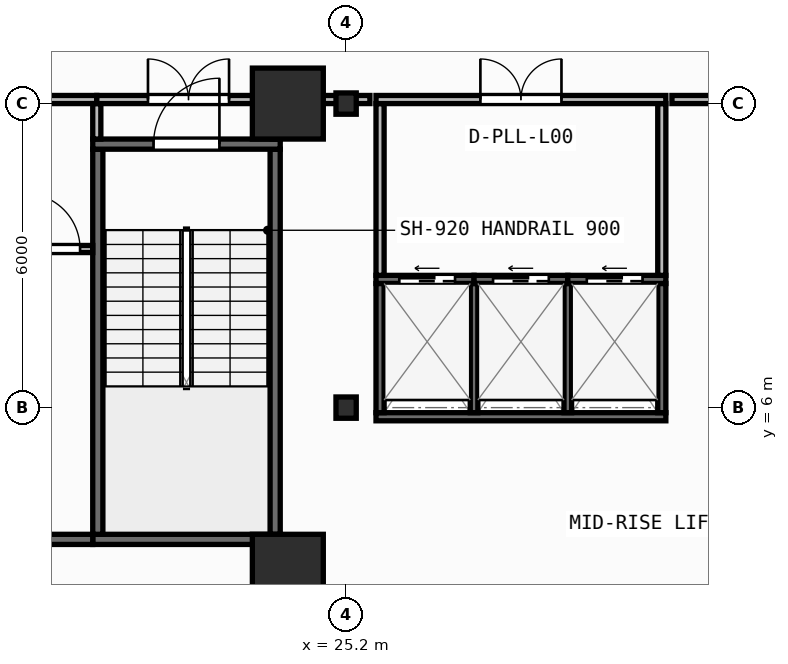
"""IFC4 building model, lengths in metres.
Left out: names, types, materials, properties, quantities, classifications, styles, units other than length and angle.
Written with IfcOpenShell. Run it as: python <this file> out.ifc"""

import sys

from ifc_helpers import new_model, si_unit, direction, frame, frame_2d, origin, origin_2d, place, context, subcontext, project, spatial, rectangle, i_section, extrude, element, fill, save


model = new_model("IFC4")
c1 = context("Model", 3, precision=1e-05, world=origin(), true_north=direction((0.0, 1.0)))
c2 = subcontext(c1, "Body", "Model", "MODEL_VIEW")
j1 = project(units=[si_unit("LENGTHUNIT", "METRE"), si_unit("PLANEANGLEUNIT", "RADIAN")], contexts=[c1])
p1 = place(None, origin())
s1 = spatial("IfcSite", under=j1, at=p1, CompositionType="ELEMENT")
p2 = place(p1, origin())
s2 = spatial("IfcBuilding", under=s1, at=p2, CompositionType="ELEMENT")
p3 = place(p2, origin())
s3 = spatial("IfcBuildingStorey", under=s2, at=p3, CompositionType="ELEMENT", Elevation=0.0)
p4 = place(p3, frame((24.05, 2.8, 0.0), z_axis=(0.0, 0.0, 1.0), x_axis=(1.0, 0.0, 0.0)))
e1 = element("IfcColumn", 1, at=p4, inside=s3, PredefinedType="COLUMN", context=c2, shape_type="SweptSolid", body=[
    extrude(rectangle(XDim=1.4, YDim=1.4, at=origin_2d()), origin(), (0.0, 0.0, 1.0), 4.5),
])
p5 = place(p3, frame((25.2, 6.0, 0.0), z_axis=(0.0, 0.0, 1.0), x_axis=(1.0, 0.0, 0.0)))
e2 = element("IfcColumn", 2, at=p5, inside=s3, PredefinedType="COLUMN", context=c2, shape_type="SweptSolid", body=[
    extrude(i_section(OverallWidth=0.4, OverallDepth=0.42, WebThickness=0.025, FlangeThickness=0.04, at=origin_2d()), origin(), (0.0, 0.0, 1.0), 4.5),
])
p6 = place(p3, frame((24.05, 12.0, 0.0), z_axis=(0.0, 0.0, 1.0), x_axis=(1.0, 0.0, 0.0)))
e3 = element("IfcColumn", 3, at=p6, inside=s3, PredefinedType="COLUMN", context=c2, shape_type="SweptSolid", body=[
    extrude(rectangle(XDim=1.4, YDim=1.4, at=origin_2d()), origin(), (0.0, 0.0, 1.0), 4.5),
])
p7 = place(p3, frame((25.2, 12.0, 0.0), z_axis=(0.0, 0.0, 1.0), x_axis=(1.0, 0.0, 0.0)))
e4 = element("IfcColumn", 4, at=p7, inside=s3, PredefinedType="COLUMN", context=c2, shape_type="SweptSolid", body=[
    extrude(i_section(OverallWidth=0.4, OverallDepth=0.42, WebThickness=0.025, FlangeThickness=0.04, at=origin_2d()), origin(), (0.0, 0.0, 1.0), 4.5),
])
p8 = place(p3, frame((20.2, 3.4, 0.0), z_axis=(0.0, 0.0, 1.0), x_axis=(1.0, 0.0, 0.0)))
e5 = element("IfcWall", 5, at=p8, inside=s3, PredefinedType="SHEAR", context=c2, shape_type="SweptSolid", body=[
    extrude(rectangle(XDim=3.7, YDim=0.2, at=frame_2d((1.85, 0.0))), origin(), (0.0, 0.0, 1.0), 4.25),
])
for number, where, z_axis, x_axis in (
    (6, (20.3, 3.5, 0.0), (0.0, 0.0, 1.0), (0.0, 1.0, 0.0)),
    (7, (23.8, 3.5, 0.0), (0.0, 0.0, 1.0), (0.0, 1.0, 0.0)),
):
    element("IfcWall", number, at=place(p3, frame(where, z_axis=z_axis, x_axis=x_axis)), inside=s3, PredefinedType="SHEAR", context=c2, shape_type="SweptSolid", body=[
        extrude(rectangle(XDim=7.6, YDim=0.2, at=frame_2d((3.8, 0.0))), origin(), (0.0, 0.0, 1.0), 4.25),
    ])
p9 = place(p3, frame((20.2, 11.2, 0.0), z_axis=(0.0, 0.0, 1.0), x_axis=(1.0, 0.0, 0.0)))
e8 = element("IfcWall", 8, at=p9, inside=s3, PredefinedType="SHEAR", context=c2, shape_type="SweptSolid", body=[
    extrude(rectangle(XDim=3.7, YDim=0.2, at=frame_2d((1.85, 0.0))), origin(), (0.0, 0.0, 1.0), 4.25),
])
p10 = place(p9, frame((1.2, 0.0, 0.0)))
e9 = element("IfcOpeningElement", 9, at=p10, cuts=e8, PredefinedType="OPENING", context=c2, shape_type="SweptSolid", body=[
    extrude(rectangle(XDim=1.3, YDim=2.15, at=frame_2d((0.65, 1.075))), frame((0.0, 0.11, 0.0), z_axis=(0.0, -1.0, 0.0), x_axis=(1.0, 0.0, 0.0)), (0.0, 0.0, 1.0), 0.22),
])
p11 = place(p3, frame((6.5, 3.4, 0.0), z_axis=(0.0, 0.0, 1.0), x_axis=(1.0, 0.0, 0.0)))
e10 = element("IfcWall", 10, at=p11, inside=s3, PredefinedType="SHEAR", context=c2, shape_type="SweptSolid", body=[
    extrude(rectangle(XDim=13.7, YDim=0.2, at=frame_2d((6.85, 0.0))), origin(), (0.0, 0.0, 1.0), 4.25),
])
p12 = place(p3, frame((25.79, 5.82, 0.0), z_axis=(0.0, 0.0, 1.0), x_axis=(1.0, 0.0, 0.0)))
e11 = element("IfcWall", 11, at=p12, inside=s3, PredefinedType="SHEAR", context=c2, shape_type="SweptSolid", body=[
    extrude(rectangle(XDim=5.72, YDim=0.16, at=frame_2d((2.86, 0.0))), origin(), (0.0, 0.0, 1.0), 4.25),
])
for number, where, z_axis, x_axis in (
    (12, (25.87, 5.9, 0.0), (0.0, 0.0, 1.0), (0.0, 1.0, 0.0)),
    (13, (31.43, 5.9, 0.0), (0.0, 0.0, 1.0), (0.0, 1.0, 0.0)),
):
    element("IfcWall", number, at=place(p3, frame(where, z_axis=z_axis, x_axis=x_axis)), inside=s3, PredefinedType="SHEAR", context=c2, shape_type="SweptSolid", body=[
        extrude(rectangle(XDim=2.55, YDim=0.16, at=frame_2d((1.275, 0.0))), origin(), (0.0, 0.0, 1.0), 4.25),
    ])
for number, where, z_axis, x_axis in (
    (14, (27.725, 5.9, 0.0), (0.0, 0.0, 1.0), (0.0, 1.0, 0.0)),
    (15, (29.575, 5.9, 0.0), (0.0, 0.0, 1.0), (0.0, 1.0, 0.0)),
):
    element("IfcWall", number, at=place(p3, frame(where, z_axis=z_axis, x_axis=x_axis)), inside=s3, PredefinedType="SHEAR", context=c2, shape_type="SweptSolid", body=[
        extrude(rectangle(XDim=2.55, YDim=0.15, at=frame_2d((1.275, 0.0))), origin(), (0.0, 0.0, 1.0), 4.25),
    ])
p13 = place(p3, frame((25.79, 8.53, 0.0), z_axis=(0.0, 0.0, 1.0), x_axis=(1.0, 0.0, 0.0)))
e16 = element("IfcWall", 16, at=p13, inside=s3, PredefinedType="SHEAR", context=c2, shape_type="SweptSolid", body=[
    extrude(rectangle(XDim=1.935, YDim=0.16, at=frame_2d((0.968, 0.0))), origin(), (0.0, 0.0, 1.0), 4.25),
])
p14 = place(p13, frame((0.46, 0.0, 0.0)))
e17 = element("IfcOpeningElement", 17, at=p14, cuts=e16, PredefinedType="OPENING", context=c2, shape_type="SweptSolid", body=[
    extrude(rectangle(XDim=1.1, YDim=2.15, at=frame_2d((0.55, 1.075))), frame((0.0, 0.09, 0.0), z_axis=(0.0, -1.0, 0.0), x_axis=(1.0, 0.0, 0.0)), (0.0, 0.0, 1.0), 0.18),
])
p15 = place(p3, frame((27.725, 8.53, 0.0), z_axis=(0.0, 0.0, 1.0), x_axis=(1.0, 0.0, 0.0)))
e18 = element("IfcWall", 18, at=p15, inside=s3, PredefinedType="SHEAR", context=c2, shape_type="SweptSolid", body=[
    extrude(rectangle(XDim=1.85, YDim=0.16, at=frame_2d((0.925, 0.0))), origin(), (0.0, 0.0, 1.0), 4.25),
])
p16 = place(p15, frame((0.375, 0.0, 0.0)))
e19 = element("IfcOpeningElement", 19, at=p16, cuts=e18, PredefinedType="OPENING", context=c2, shape_type="SweptSolid", body=[
    extrude(rectangle(XDim=1.1, YDim=2.15, at=frame_2d((0.55, 1.075))), frame((0.0, 0.09, 0.0), z_axis=(0.0, -1.0, 0.0), x_axis=(1.0, 0.0, 0.0)), (0.0, 0.0, 1.0), 0.18),
])
p17 = place(p3, frame((29.575, 8.53, 0.0), z_axis=(0.0, 0.0, 1.0), x_axis=(1.0, 0.0, 0.0)))
e20 = element("IfcWall", 20, at=p17, inside=s3, PredefinedType="SHEAR", context=c2, shape_type="SweptSolid", body=[
    extrude(rectangle(XDim=1.935, YDim=0.16, at=frame_2d((0.968, 0.0))), origin(), (0.0, 0.0, 1.0), 4.25),
])
p18 = place(p17, frame((0.375, 0.0, 0.0)))
e21 = element("IfcOpeningElement", 21, at=p18, cuts=e20, PredefinedType="OPENING", context=c2, shape_type="SweptSolid", body=[
    extrude(rectangle(XDim=1.1, YDim=2.15, at=frame_2d((0.55, 1.075))), frame((0.0, 0.09, 0.0), z_axis=(0.0, -1.0, 0.0), x_axis=(1.0, 0.0, 0.0)), (0.0, 0.0, 1.0), 0.18),
])
p19 = place(p3, frame((18.61, 9.13, 0.0), z_axis=(0.0, 0.0, 1.0), x_axis=(1.0, 0.0, 0.0)))
e22 = element("IfcWall", 22, at=p19, inside=s3, PredefinedType="PARTITIONING", context=c2, shape_type="SweptSolid", body=[
    extrude(rectangle(XDim=1.59, YDim=0.14, at=frame_2d((0.795, 0.0))), origin(), (0.0, 0.0, 1.0), 4.25),
])
p20 = place(p19, frame((0.24, 0.0, 0.0)))
e23 = element("IfcOpeningElement", 23, at=p20, cuts=e22, PredefinedType="OPENING", context=c2, shape_type="SweptSolid", body=[
    extrude(rectangle(XDim=1.1, YDim=2.1, at=frame_2d((0.55, 1.05))), frame((0.0, 0.08, 0.0), z_axis=(0.0, -1.0, 0.0), x_axis=(1.0, 0.0, 0.0)), (0.0, 0.0, 1.0), 0.16),
])
p21 = place(p3, frame((12.58, 12.08, 0.0), z_axis=(0.0, 0.0, 1.0), x_axis=(1.0, 0.0, 0.0)))
e24 = element("IfcWall", 24, at=p21, inside=s3, PredefinedType="PARTITIONING", context=c2, shape_type="SweptSolid", body=[
    extrude(rectangle(XDim=7.7, YDim=0.16, at=frame_2d((3.85, 0.0))), origin(), (0.0, 0.0, 1.0), 3.425),
])
p22 = place(p21, frame((3.05, 0.0, 0.0)))
e25 = element("IfcOpeningElement", 25, at=p22, cuts=e24, PredefinedType="OPENING", context=c2, shape_type="SweptSolid", body=[
    extrude(rectangle(XDim=1.6, YDim=2.05, at=frame_2d((0.8, 1.025))), frame((0.0, 0.09, 0.0), z_axis=(0.0, -1.0, 0.0), x_axis=(1.0, 0.0, 0.0)), (0.0, 0.0, 1.0), 0.18),
])
p23 = place(p3, frame((20.28, 11.3, 0.0), z_axis=(0.0, 0.0, 1.0), x_axis=(0.0, 1.0, 0.0)))
e26 = element("IfcWall", 26, at=p23, inside=s3, PredefinedType="PARTITIONING", context=c2, shape_type="SweptSolid", body=[
    extrude(rectangle(XDim=0.7, YDim=0.16, at=frame_2d((0.35, 0.0))), origin(), (0.0, 0.0, 1.0), 4.25),
])
p24 = place(p3, frame((20.28, 12.08, 0.0), z_axis=(0.0, 0.0, 1.0), x_axis=(1.0, 0.0, 0.0)))
e27 = element("IfcWall", 27, at=p24, inside=s3, PredefinedType="PARTITIONING", context=c2, shape_type="SweptSolid", body=[
    extrude(rectangle(XDim=3.62, YDim=0.16, at=frame_2d((1.81, 0.0))), origin(), (0.0, 0.0, 1.0), 3.425),
])
p25 = place(p24, frame((1.01, 0.0, 0.0)))
e28 = element("IfcOpeningElement", 28, at=p25, cuts=e27, PredefinedType="OPENING", context=c2, shape_type="SweptSolid", body=[
    extrude(rectangle(XDim=1.6, YDim=2.05, at=frame_2d((0.8, 1.025))), frame((0.0, 0.09, 0.0), z_axis=(0.0, -1.0, 0.0), x_axis=(1.0, 0.0, 0.0)), (0.0, 0.0, 1.0), 0.18),
])
p26 = place(p3, frame((23.82, 11.3, 0.0), z_axis=(0.0, 0.0, 1.0), x_axis=(0.0, 1.0, 0.0)))
e29 = element("IfcWall", 29, at=p26, inside=s3, PredefinedType="PARTITIONING", context=c2, shape_type="SweptSolid", body=[
    extrude(rectangle(XDim=0.7, YDim=0.16, at=frame_2d((0.35, 0.0))), origin(), (0.0, 0.0, 1.0), 4.25),
])
for number, where, z_axis, x_axis in (
    (30, (25.87, 8.61, 0.0), (0.0, 0.0, 1.0), (0.0, 1.0, 0.0)),
    (31, (31.43, 8.61, 0.0), (0.0, 0.0, 1.0), (0.0, 1.0, 0.0)),
):
    element("IfcWall", number, at=place(p3, frame(where, z_axis=z_axis, x_axis=x_axis)), inside=s3, PredefinedType="PARTITIONING", context=c2, shape_type="SweptSolid", body=[
        extrude(rectangle(XDim=3.39, YDim=0.16, at=frame_2d((1.695, 0.0))), origin(), (0.0, 0.0, 1.0), 4.25),
    ])
p27 = place(p3, frame((25.79, 12.08, 0.0), z_axis=(0.0, 0.0, 1.0), x_axis=(1.0, 0.0, 0.0)))
e32 = element("IfcWall", 32, at=p27, inside=s3, PredefinedType="PARTITIONING", context=c2, shape_type="SweptSolid", body=[
    extrude(rectangle(XDim=5.72, YDim=0.16, at=frame_2d((2.86, 0.0))), origin(), (0.0, 0.0, 1.0), 3.425),
])
p28 = place(p27, frame((2.06, 0.0, 0.0)))
e33 = element("IfcOpeningElement", 33, at=p28, cuts=e32, PredefinedType="OPENING", context=c2, shape_type="SweptSolid", body=[
    extrude(rectangle(XDim=1.6, YDim=2.05, at=frame_2d((0.8, 1.025))), frame((0.0, 0.09, 0.0), z_axis=(0.0, -1.0, 0.0), x_axis=(1.0, 0.0, 0.0)), (0.0, 0.0, 1.0), 0.18),
])
p29 = place(p3, frame((24.02, 12.08, 0.0), z_axis=(0.0, 0.0, 1.0), x_axis=(1.0, 0.0, 0.0)))
e34 = element("IfcWall", 34, at=p29, inside=s3, PredefinedType="PARTITIONING", context=c2, shape_type="SweptSolid", body=[
    extrude(rectangle(XDim=1.65, YDim=0.16, at=frame_2d((0.825, 0.0))), origin(), (0.0, 0.0, 1.0), 3.425),
])
p30 = place(p3, frame((31.63, 12.08, 0.0), z_axis=(0.0, 0.0, 1.0), x_axis=(1.0, 0.0, 0.0)))
e35 = element("IfcWall", 35, at=p30, inside=s3, PredefinedType="PARTITIONING", context=c2, shape_type="SweptSolid", body=[
    extrude(rectangle(XDim=2.44, YDim=0.16, at=frame_2d((1.22, 0.0))), origin(), (0.0, 0.0, 1.0), 3.425),
])
p31 = place(p10, origin())
e36 = element("IfcDoor", 36, at=p31, inside=s3, OperationType="SINGLE_SWING_RIGHT", PredefinedType="DOOR", context=c2, shape_type="SweptSolid", body=[
    extrude(rectangle(XDim=1.3, YDim=2.15, at=frame_2d((0.65, 1.075))), frame((0.0, 0.025, 0.0), z_axis=(0.0, -1.0, 0.0), x_axis=(1.0, 0.0, 0.0)), (0.0, 0.0, 1.0), 0.05),
])
fill(e9, e36)
p32 = place(p14, origin())
e37 = element("IfcDoor", 37, at=p32, inside=s3, OperationType="SLIDING_TO_LEFT", PredefinedType="DOOR", context=c2, shape_type="SweptSolid", body=[
    extrude(rectangle(XDim=1.1, YDim=2.15, at=frame_2d((0.55, 1.075))), frame((0.0, 0.025, 0.0), z_axis=(0.0, -1.0, 0.0), x_axis=(1.0, 0.0, 0.0)), (0.0, 0.0, 1.0), 0.05),
])
fill(e17, e37)
p33 = place(p16, origin())
e38 = element("IfcDoor", 38, at=p33, inside=s3, OperationType="SLIDING_TO_LEFT", PredefinedType="DOOR", context=c2, shape_type="SweptSolid", body=[
    extrude(rectangle(XDim=1.1, YDim=2.15, at=frame_2d((0.55, 1.075))), frame((0.0, 0.025, 0.0), z_axis=(0.0, -1.0, 0.0), x_axis=(1.0, 0.0, 0.0)), (0.0, 0.0, 1.0), 0.05),
])
fill(e19, e38)
p34 = place(p18, origin())
e39 = element("IfcDoor", 39, at=p34, inside=s3, OperationType="SLIDING_TO_LEFT", PredefinedType="DOOR", context=c2, shape_type="SweptSolid", body=[
    extrude(rectangle(XDim=1.1, YDim=2.15, at=frame_2d((0.55, 1.075))), frame((0.0, 0.025, 0.0), z_axis=(0.0, -1.0, 0.0), x_axis=(1.0, 0.0, 0.0)), (0.0, 0.0, 1.0), 0.05),
])
fill(e21, e39)
p35 = place(p20, origin())
e40 = element("IfcDoor", 40, at=p35, inside=s3, OperationType="SINGLE_SWING_LEFT", PredefinedType="DOOR", context=c2, shape_type="SweptSolid", body=[
    extrude(rectangle(XDim=1.1, YDim=2.1, at=frame_2d((0.55, 1.05))), frame((0.0, 0.025, 0.0), z_axis=(0.0, -1.0, 0.0), x_axis=(1.0, 0.0, 0.0)), (0.0, 0.0, 1.0), 0.05),
])
fill(e23, e40)
p36 = place(p25, origin())
e41 = element("IfcDoor", 41, at=p36, inside=s3, OperationType="DOUBLE_DOOR_SINGLE_SWING", PredefinedType="DOOR", context=c2, shape_type="SweptSolid", body=[
    extrude(rectangle(XDim=1.6, YDim=2.05, at=frame_2d((0.8, 1.025))), frame((0.0, 0.025, 0.0), z_axis=(0.0, -1.0, 0.0), x_axis=(1.0, 0.0, 0.0)), (0.0, 0.0, 1.0), 0.05),
])
fill(e28, e41)
p37 = place(p28, origin())
e42 = element("IfcDoor", 42, at=p37, inside=s3, OperationType="DOUBLE_DOOR_SINGLE_SWING", PredefinedType="DOOR", context=c2, shape_type="SweptSolid", body=[
    extrude(rectangle(XDim=1.6, YDim=2.05, at=frame_2d((0.8, 1.025))), frame((0.0, 0.025, 0.0), z_axis=(0.0, -1.0, 0.0), x_axis=(1.0, 0.0, 0.0)), (0.0, 0.0, 1.0), 0.05),
])
fill(e33, e42)
save(model, sys.argv[1])
